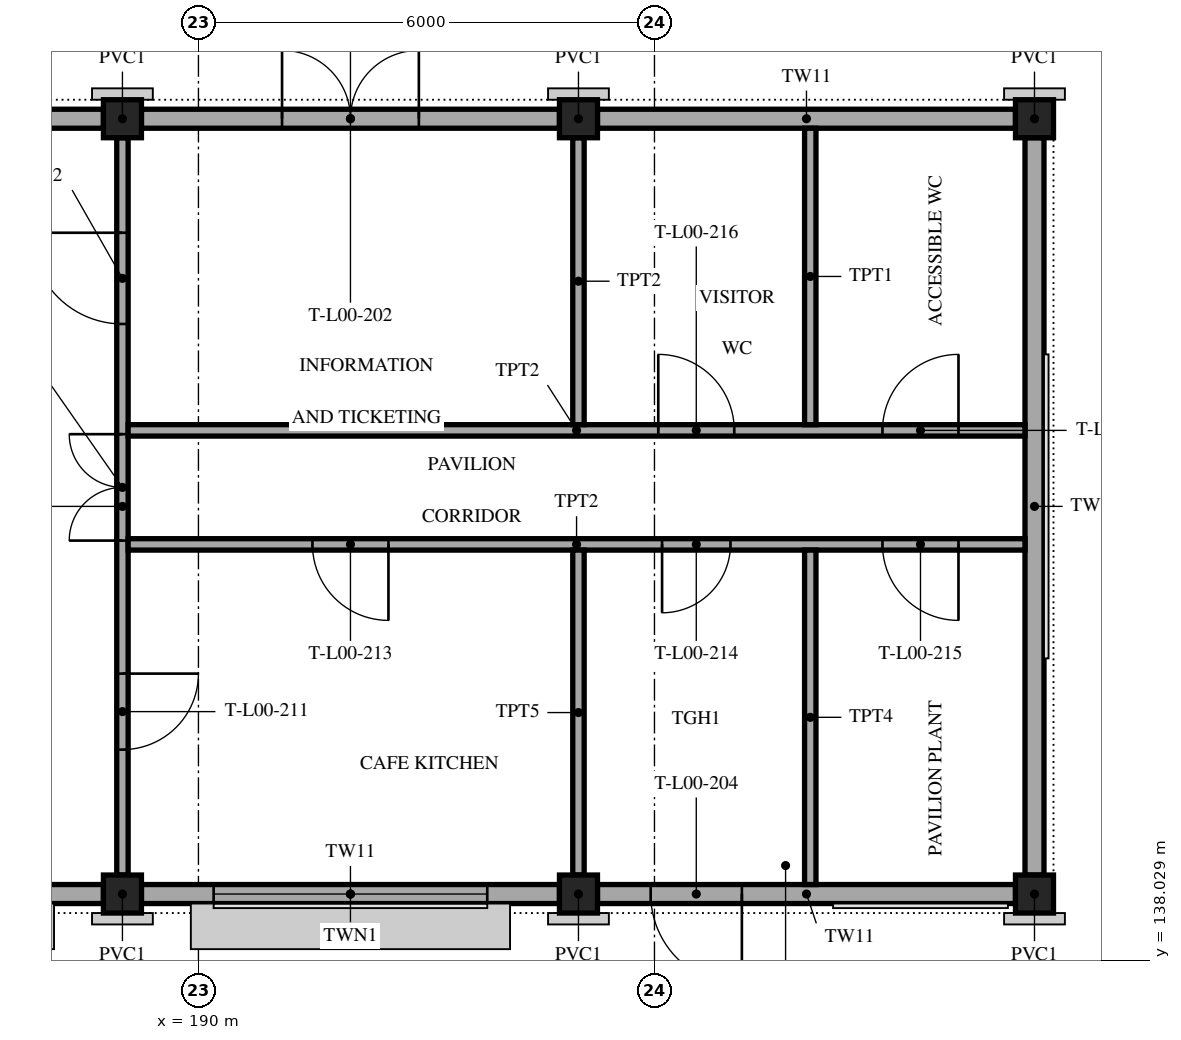
"""IFC4 building model, lengths in metres.
Left out: names, types, materials, properties, quantities, classifications, styles, units other than length and angle.
Written with IfcOpenShell. Run it as: python <this file> out.ifc"""

import sys

from ifc_helpers import new_model, si_unit, direction, frame, frame_2d, origin, origin_2d, place, context, subcontext, project, spatial, polyline, rectangle, outline, extrude, element, fill, save


model = new_model("IFC4")
c1 = context("Model", 3, precision=1e-05, world=origin(), true_north=direction((0.0, 1.0)))
c2 = subcontext(c1, "Body", "Model", "MODEL_VIEW")
j1 = project(units=[si_unit("LENGTHUNIT", "METRE"), si_unit("PLANEANGLEUNIT", "RADIAN")], contexts=[c1])
p1 = place(None, origin())
s1 = spatial("IfcSite", under=j1, at=p1, CompositionType="ELEMENT")
p2 = place(p1, origin())
s2 = spatial("IfcBuilding", under=s1, at=p2, CompositionType="ELEMENT")
p3 = place(p2, origin())
s3 = spatial("IfcBuildingStorey", under=s2, at=p3, CompositionType="ELEMENT", Elevation=0.0)
for number, where, z_axis, x_axis in (
    (1, (189.0, 138.9, 0.0), (0.0, 0.0, 1.0), (1.0, 0.0, 0.0)),
    (2, (189.0, 149.1, 0.0), (0.0, 0.0, 1.0), (1.0, 0.0, 0.0)),
    (3, (195.0, 138.9, 0.0), (0.0, 0.0, 1.0), (1.0, 0.0, 0.0)),
    (4, (195.0, 149.1, 0.0), (0.0, 0.0, 1.0), (1.0, 0.0, 0.0)),
    (5, (201.0, 138.9, 0.0), (0.0, 0.0, 1.0), (1.0, 0.0, 0.0)),
    (6, (201.0, 149.1, 0.0), (0.0, 0.0, 1.0), (1.0, 0.0, 0.0)),
):
    element("IfcColumn", number, at=place(p3, frame(where, z_axis=z_axis, x_axis=x_axis)), inside=s3, PredefinedType="COLUMN", context=c2, shape_type="SweptSolid", body=[
        extrude(rectangle(XDim=0.5, YDim=0.5, at=origin_2d()), origin(), (0.0, 0.0, 1.0), 4.35),
    ])
p4 = place(p3, frame((183.25, 138.9, 0.0), z_axis=(0.0, 0.0, 1.0), x_axis=(1.0, 0.0, 0.0)))
e7 = element("IfcWall", 7, at=p4, inside=s3, PredefinedType="SOLIDWALL", context=c2, shape_type="SweptSolid", body=[
    extrude(rectangle(XDim=5.5, YDim=0.25, at=frame_2d((2.75, 0.0))), origin(), (0.0, 0.0, 1.0), 4.55),
])
p5 = place(p4, frame((0.95, 0.0, 0.9)))
e8 = element("IfcOpeningElement", 8, at=p5, cuts=e7, PredefinedType="OPENING", context=c2, shape_type="SweptSolid", body=[
    extrude(rectangle(XDim=3.6, YDim=2.4, at=frame_2d((1.8, 1.2))), frame((0.0, 0.135, 0.0), z_axis=(0.0, -1.0, 0.0), x_axis=(1.0, 0.0, 0.0)), (0.0, 0.0, 1.0), 0.27),
])
p6 = place(p3, frame((189.25, 138.9, 0.0), z_axis=(0.0, 0.0, 1.0), x_axis=(1.0, 0.0, 0.0)))
e9 = element("IfcWall", 9, at=p6, inside=s3, PredefinedType="SOLIDWALL", context=c2, shape_type="SweptSolid", body=[
    extrude(rectangle(XDim=5.5, YDim=0.25, at=frame_2d((2.75, 0.0))), origin(), (0.0, 0.0, 1.0), 4.55),
])
p7 = place(p6, frame((0.95, 0.0, 0.9)))
e10 = element("IfcOpeningElement", 10, at=p7, cuts=e9, PredefinedType="OPENING", context=c2, shape_type="SweptSolid", body=[
    extrude(rectangle(XDim=3.6, YDim=2.4, at=frame_2d((1.8, 1.2))), frame((0.0, 0.135, 0.0), z_axis=(0.0, -1.0, 0.0), x_axis=(1.0, 0.0, 0.0)), (0.0, 0.0, 1.0), 0.27),
])
p8 = place(p3, frame((195.25, 138.9, 0.0), z_axis=(0.0, 0.0, 1.0), x_axis=(1.0, 0.0, 0.0)))
e11 = element("IfcWall", 11, at=p8, inside=s3, PredefinedType="SOLIDWALL", context=c2, shape_type="SweptSolid", body=[
    extrude(rectangle(XDim=5.5, YDim=0.25, at=frame_2d((2.75, 0.0))), origin(), (0.0, 0.0, 1.0), 4.55),
])
p9 = place(p8, frame((0.7, 0.0, 0.0)))
e12 = element("IfcOpeningElement", 12, at=p9, cuts=e11, PredefinedType="OPENING", context=c2, shape_type="SweptSolid", body=[
    extrude(rectangle(XDim=1.2, YDim=2.1, at=frame_2d((0.6, 1.05))), frame((0.0, 0.135, 0.0), z_axis=(0.0, -1.0, 0.0), x_axis=(1.0, 0.0, 0.0)), (0.0, 0.0, 1.0), 0.27),
])
p10 = place(p3, frame((183.25, 149.1, 0.0), z_axis=(0.0, 0.0, 1.0), x_axis=(1.0, 0.0, 0.0)))
e13 = element("IfcWall", 13, at=p10, inside=s3, PredefinedType="SOLIDWALL", context=c2, shape_type="SweptSolid", body=[
    extrude(rectangle(XDim=5.5, YDim=0.25, at=frame_2d((2.75, 0.0))), origin(), (0.0, 0.0, 1.0), 4.55),
])
p11 = place(p10, frame((0.95, 0.0, 0.9)))
e14 = element("IfcOpeningElement", 14, at=p11, cuts=e13, PredefinedType="OPENING", context=c2, shape_type="SweptSolid", body=[
    extrude(rectangle(XDim=3.6, YDim=2.4, at=frame_2d((1.8, 1.2))), frame((0.0, 0.135, 0.0), z_axis=(0.0, -1.0, 0.0), x_axis=(1.0, 0.0, 0.0)), (0.0, 0.0, 1.0), 0.27),
])
p12 = place(p3, frame((189.25, 149.1, 0.0), z_axis=(0.0, 0.0, 1.0), x_axis=(1.0, 0.0, 0.0)))
e15 = element("IfcWall", 15, at=p12, inside=s3, PredefinedType="SOLIDWALL", context=c2, shape_type="SweptSolid", body=[
    extrude(rectangle(XDim=5.5, YDim=0.25, at=frame_2d((2.75, 0.0))), origin(), (0.0, 0.0, 1.0), 4.55),
])
p13 = place(p12, frame((1.85, 0.0, 0.0)))
e16 = element("IfcOpeningElement", 16, at=p13, cuts=e15, PredefinedType="OPENING", context=c2, shape_type="SweptSolid", body=[
    extrude(rectangle(XDim=1.8, YDim=2.1, at=frame_2d((0.9, 1.05))), frame((0.0, 0.135, 0.0), z_axis=(0.0, -1.0, 0.0), x_axis=(1.0, 0.0, 0.0)), (0.0, 0.0, 1.0), 0.27),
])
p14 = place(p3, frame((195.25, 149.1, 0.0), z_axis=(0.0, 0.0, 1.0), x_axis=(1.0, 0.0, 0.0)))
e17 = element("IfcWall", 17, at=p14, inside=s3, PredefinedType="SOLIDWALL", context=c2, shape_type="SweptSolid", body=[
    extrude(rectangle(XDim=5.5, YDim=0.25, at=frame_2d((2.75, 0.0))), origin(), (0.0, 0.0, 1.0), 4.55),
])
p15 = place(p3, frame((201.0, 139.15, 0.0), z_axis=(0.0, 0.0, 1.0), x_axis=(0.0, 1.0, 0.0)))
e18 = element("IfcWall", 18, at=p15, inside=s3, PredefinedType="SOLIDWALL", context=c2, shape_type="SweptSolid", body=[
    extrude(rectangle(XDim=9.7, YDim=0.25, at=frame_2d((4.85, 0.0))), origin(), (0.0, 0.0, 1.0), 4.35),
])
p16 = place(p3, frame((189.0, 139.15, 0.0), z_axis=(0.0, 0.0, 1.0), x_axis=(0.0, 1.0, 0.0)))
e19 = element("IfcWall", 19, at=p16, inside=s3, PredefinedType="PARTITIONING", context=c2, shape_type="SweptSolid", body=[
    extrude(rectangle(XDim=9.7, YDim=0.15, at=frame_2d((4.85, 0.0))), origin(), (0.0, 0.0, 1.0), 4.35),
])
p17 = place(p16, frame((4.4, 0.0, 0.0)))
e20 = element("IfcOpeningElement", 20, at=p17, cuts=e19, PredefinedType="OPENING", context=c2, shape_type="SweptSolid", body=[
    extrude(rectangle(XDim=1.4, YDim=2.1, at=frame_2d((0.7, 1.05))), frame((0.0, 0.085, 0.0), z_axis=(0.0, -1.0, 0.0), x_axis=(1.0, 0.0, 0.0)), (0.0, 0.0, 1.0), 0.17),
])
p18 = place(p16, frame((1.65, 0.0, 0.0)))
e21 = element("IfcOpeningElement", 21, at=p18, cuts=e19, PredefinedType="OPENING", context=c2, shape_type="SweptSolid", body=[
    extrude(rectangle(XDim=1.0, YDim=2.1, at=frame_2d((0.5, 1.05))), frame((0.0, 0.085, 0.0), z_axis=(0.0, -1.0, 0.0), x_axis=(1.0, 0.0, 0.0)), (0.0, 0.0, 1.0), 0.17),
])
p19 = place(p16, frame((7.25, 0.0, 0.0)))
e22 = element("IfcOpeningElement", 22, at=p19, cuts=e19, PredefinedType="OPENING", context=c2, shape_type="SweptSolid", body=[
    extrude(rectangle(XDim=1.2, YDim=2.1, at=frame_2d((0.6, 1.05))), frame((0.0, 0.085, 0.0), z_axis=(0.0, -1.0, 0.0), x_axis=(1.0, 0.0, 0.0)), (0.0, 0.0, 1.0), 0.17),
])
p20 = place(p3, frame((189.075, 143.5, 0.0), z_axis=(0.0, 0.0, 1.0), x_axis=(1.0, 0.0, 0.0)))
e23 = element("IfcWall", 23, at=p20, inside=s3, PredefinedType="PARTITIONING", context=c2, shape_type="SweptSolid", body=[
    extrude(rectangle(XDim=11.8, YDim=0.15, at=frame_2d((5.9, 0.0))), origin(), (0.0, 0.0, 1.0), 4.55),
])
p21 = place(p20, frame((2.425, 0.0, 0.0)))
e24 = element("IfcOpeningElement", 24, at=p21, cuts=e23, PredefinedType="OPENING", context=c2, shape_type="SweptSolid", body=[
    extrude(rectangle(XDim=1.0, YDim=2.1, at=frame_2d((0.5, 1.05))), frame((0.0, 0.085, 0.0), z_axis=(0.0, -1.0, 0.0), x_axis=(1.0, 0.0, 0.0)), (0.0, 0.0, 1.0), 0.17),
])
p22 = place(p20, frame((7.025, 0.0, 0.0)))
e25 = element("IfcOpeningElement", 25, at=p22, cuts=e23, PredefinedType="OPENING", context=c2, shape_type="SweptSolid", body=[
    extrude(rectangle(XDim=0.9, YDim=2.1, at=frame_2d((0.45, 1.05))), frame((0.0, 0.085, 0.0), z_axis=(0.0, -1.0, 0.0), x_axis=(1.0, 0.0, 0.0)), (0.0, 0.0, 1.0), 0.17),
])
p23 = place(p20, frame((9.925, 0.0, 0.0)))
e26 = element("IfcOpeningElement", 26, at=p23, cuts=e23, PredefinedType="OPENING", context=c2, shape_type="SweptSolid", body=[
    extrude(rectangle(XDim=1.0, YDim=2.1, at=frame_2d((0.5, 1.05))), frame((0.0, 0.085, 0.0), z_axis=(0.0, -1.0, 0.0), x_axis=(1.0, 0.0, 0.0)), (0.0, 0.0, 1.0), 0.17),
])
p24 = place(p3, frame((189.075, 145.0, 0.0), z_axis=(0.0, 0.0, 1.0), x_axis=(1.0, 0.0, 0.0)))
e27 = element("IfcWall", 27, at=p24, inside=s3, PredefinedType="PARTITIONING", context=c2, shape_type="SweptSolid", body=[
    extrude(rectangle(XDim=11.8, YDim=0.15, at=frame_2d((5.9, 0.0))), origin(), (0.0, 0.0, 1.0), 4.55),
])
p25 = place(p24, frame((6.975, 0.0, 0.0)))
e28 = element("IfcOpeningElement", 28, at=p25, cuts=e27, PredefinedType="OPENING", context=c2, shape_type="SweptSolid", body=[
    extrude(rectangle(XDim=1.0, YDim=2.1, at=frame_2d((0.5, 1.05))), frame((0.0, 0.085, 0.0), z_axis=(0.0, -1.0, 0.0), x_axis=(1.0, 0.0, 0.0)), (0.0, 0.0, 1.0), 0.17),
])
p26 = place(p24, frame((9.925, 0.0, 0.0)))
e29 = element("IfcOpeningElement", 29, at=p26, cuts=e27, PredefinedType="OPENING", context=c2, shape_type="SweptSolid", body=[
    extrude(rectangle(XDim=1.0, YDim=2.1, at=frame_2d((0.5, 1.05))), frame((0.0, 0.085, 0.0), z_axis=(0.0, -1.0, 0.0), x_axis=(1.0, 0.0, 0.0)), (0.0, 0.0, 1.0), 0.17),
])
p27 = place(p3, frame((195.0, 139.15, 0.0), z_axis=(0.0, 0.0, 1.0), x_axis=(0.0, 1.0, 0.0)))
e30 = element("IfcWall", 30, at=p27, inside=s3, PredefinedType="PARTITIONING", context=c2, shape_type="SweptSolid", body=[
    extrude(rectangle(XDim=4.275, YDim=0.15, at=frame_2d((2.138, 0.0))), origin(), (0.0, 0.0, 1.0), 4.35),
])
p28 = place(p3, frame((198.05, 139.025, 0.0), z_axis=(0.0, 0.0, 1.0), x_axis=(0.0, 1.0, 0.0)))
e31 = element("IfcWall", 31, at=p28, inside=s3, PredefinedType="PARTITIONING", context=c2, shape_type="SweptSolid", body=[
    extrude(rectangle(XDim=4.4, YDim=0.15, at=frame_2d((2.2, 0.0))), origin(), (0.0, 0.0, 1.0), 4.55),
])
p29 = place(p3, frame((195.0, 145.075, 0.0), z_axis=(0.0, 0.0, 1.0), x_axis=(0.0, 1.0, 0.0)))
e32 = element("IfcWall", 32, at=p29, inside=s3, PredefinedType="PARTITIONING", context=c2, shape_type="SweptSolid", body=[
    extrude(rectangle(XDim=3.775, YDim=0.15, at=frame_2d((1.888, 0.0))), origin(), (0.0, 0.0, 1.0), 4.35),
])
p30 = place(p3, frame((198.05, 145.075, 0.0), z_axis=(0.0, 0.0, 1.0), x_axis=(0.0, 1.0, 0.0)))
e33 = element("IfcWall", 33, at=p30, inside=s3, PredefinedType="PARTITIONING", context=c2, shape_type="SweptSolid", body=[
    extrude(rectangle(XDim=3.9, YDim=0.15, at=frame_2d((1.95, 0.0))), origin(), (0.0, 0.0, 1.0), 4.55),
])
p31 = place(p7, origin())
e34 = element("IfcWindow", 34, at=p31, inside=s3, PartitioningType="TRIPLE_PANEL_VERTICAL", PredefinedType="WINDOW", context=c2, shape_type="SweptSolid", body=[
    extrude(outline(polyline([(0.0, 0.0), (3.6, 0.0), (3.6, 2.4), (0.0, 2.4), (0.0, 0.0)]), holes=[polyline([(0.06, 0.06), (0.96, 0.06), (0.96, 2.34), (0.06, 2.34), (0.06, 0.06)]), polyline([(1.06, 0.06), (2.54, 0.06), (2.54, 2.34), (1.06, 2.34), (1.06, 0.06)]), polyline([(2.64, 0.06), (3.54, 0.06), (3.54, 2.34), (2.64, 2.34), (2.64, 0.06)])]), frame((0.0, 0.03, 0.0), z_axis=(0.0, -1.0, 0.0), x_axis=(1.0, 0.0, 0.0)), (0.0, 0.0, 1.0), 0.06),
    extrude(rectangle(XDim=0.924, YDim=2.304, at=frame_2d((0.51, 1.2))), frame((0.0, 0.01, 0.0), z_axis=(0.0, -1.0, 0.0), x_axis=(1.0, 0.0, 0.0)), (0.0, 0.0, 1.0), 0.02),
    extrude(rectangle(XDim=1.504, YDim=2.304, at=frame_2d((1.8, 1.2))), frame((0.0, 0.01, 0.0), z_axis=(0.0, -1.0, 0.0), x_axis=(1.0, 0.0, 0.0)), (0.0, 0.0, 1.0), 0.02),
    extrude(rectangle(XDim=0.924, YDim=2.304, at=frame_2d((3.09, 1.2))), frame((0.0, 0.01, 0.0), z_axis=(0.0, -1.0, 0.0), x_axis=(1.0, 0.0, 0.0)), (0.0, 0.0, 1.0), 0.02),
])
fill(e10, e34)
p32 = place(p9, frame((1.2, 0.0, 0.0), z_axis=(0.0, 0.0, 1.0), x_axis=(-1.0, 0.0, 0.0)))
e35 = element("IfcDoor", 35, at=p32, inside=s3, OperationType="SINGLE_SWING_LEFT", PredefinedType="DOOR", context=c2, shape_type="SweptSolid", body=[
    extrude(rectangle(XDim=1.2, YDim=2.1, at=frame_2d((0.6, 1.05))), frame((0.0, 0.025, 0.0), z_axis=(0.0, -1.0, 0.0), x_axis=(1.0, 0.0, 0.0)), (0.0, 0.0, 1.0), 0.05),
])
fill(e12, e35)
p33 = place(p13, origin())
e36 = element("IfcDoor", 36, at=p33, inside=s3, OperationType="DOUBLE_DOOR_SINGLE_SWING", PredefinedType="DOOR", context=c2, shape_type="SweptSolid", body=[
    extrude(rectangle(XDim=1.8, YDim=2.1, at=frame_2d((0.9, 1.05))), frame((0.0, 0.025, 0.0), z_axis=(0.0, -1.0, 0.0), x_axis=(1.0, 0.0, 0.0)), (0.0, 0.0, 1.0), 0.05),
])
fill(e16, e36)
p34 = place(p2, frame((0.0, 0.0, 5.0)))
p35 = place(p34, frame((0.0, 0.0, -0.15)))
p36 = place(p35, frame((196.55, 141.2, 0.0)))
p37 = place(p36, frame((0.0, 0.0, 0.1)))
e37 = element("IfcWindow", 37, at=p37, inside=s3, PartitioningType="SINGLE_PANEL", PredefinedType="SKYLIGHT", context=c2, shape_type="SweptSolid", body=[
    extrude(rectangle(XDim=0.9, YDim=0.9, at=origin_2d()), origin(), (0.0, 0.0, 1.0), 0.05),
])
p38 = place(p17, origin())
e38 = element("IfcDoor", 38, at=p38, inside=s3, OperationType="DOUBLE_DOOR_SINGLE_SWING", PredefinedType="DOOR", context=c2, shape_type="SweptSolid", body=[
    extrude(rectangle(XDim=1.4, YDim=2.1, at=frame_2d((0.7, 1.05))), frame((0.0, 0.025, 0.0), z_axis=(0.0, -1.0, 0.0), x_axis=(1.0, 0.0, 0.0)), (0.0, 0.0, 1.0), 0.05),
])
fill(e20, e38)
p39 = place(p18, frame((1.0, 0.0, 0.0), z_axis=(0.0, 0.0, 1.0), x_axis=(-1.0, 0.0, 0.0)))
e39 = element("IfcDoor", 39, at=p39, inside=s3, OperationType="SINGLE_SWING_LEFT", PredefinedType="DOOR", context=c2, shape_type="SweptSolid", body=[
    extrude(rectangle(XDim=1.0, YDim=2.1, at=frame_2d((0.5, 1.05))), frame((0.0, 0.025, 0.0), z_axis=(0.0, -1.0, 0.0), x_axis=(1.0, 0.0, 0.0)), (0.0, 0.0, 1.0), 0.05),
])
fill(e21, e39)
p40 = place(p19, origin())
e40 = element("IfcDoor", 40, at=p40, inside=s3, OperationType="SINGLE_SWING_RIGHT", PredefinedType="DOOR", context=c2, shape_type="SweptSolid", body=[
    extrude(rectangle(XDim=1.2, YDim=2.1, at=frame_2d((0.6, 1.05))), frame((0.0, 0.025, 0.0), z_axis=(0.0, -1.0, 0.0), x_axis=(1.0, 0.0, 0.0)), (0.0, 0.0, 1.0), 0.05),
])
fill(e22, e40)
p41 = place(p21, frame((1.0, 0.0, 0.0), z_axis=(0.0, 0.0, 1.0), x_axis=(-1.0, 0.0, 0.0)))
e41 = element("IfcDoor", 41, at=p41, inside=s3, OperationType="SINGLE_SWING_LEFT", PredefinedType="DOOR", context=c2, shape_type="SweptSolid", body=[
    extrude(rectangle(XDim=1.0, YDim=2.1, at=frame_2d((0.5, 1.05))), frame((0.0, 0.025, 0.0), z_axis=(0.0, -1.0, 0.0), x_axis=(1.0, 0.0, 0.0)), (0.0, 0.0, 1.0), 0.05),
])
fill(e24, e41)
p42 = place(p22, frame((0.9, 0.0, 0.0), z_axis=(0.0, 0.0, 1.0), x_axis=(-1.0, 0.0, 0.0)))
e42 = element("IfcDoor", 42, at=p42, inside=s3, OperationType="SINGLE_SWING_RIGHT", PredefinedType="DOOR", context=c2, shape_type="SweptSolid", body=[
    extrude(rectangle(XDim=0.9, YDim=2.1, at=frame_2d((0.45, 1.05))), frame((0.0, 0.025, 0.0), z_axis=(0.0, -1.0, 0.0), x_axis=(1.0, 0.0, 0.0)), (0.0, 0.0, 1.0), 0.05),
])
fill(e25, e42)
p43 = place(p23, frame((1.0, 0.0, 0.0), z_axis=(0.0, 0.0, 1.0), x_axis=(-1.0, 0.0, 0.0)))
e43 = element("IfcDoor", 43, at=p43, inside=s3, OperationType="SINGLE_SWING_LEFT", PredefinedType="DOOR", context=c2, shape_type="SweptSolid", body=[
    extrude(rectangle(XDim=1.0, YDim=2.1, at=frame_2d((0.5, 1.05))), frame((0.0, 0.025, 0.0), z_axis=(0.0, -1.0, 0.0), x_axis=(1.0, 0.0, 0.0)), (0.0, 0.0, 1.0), 0.05),
])
fill(e26, e43)
p44 = place(p25, origin())
e44 = element("IfcDoor", 44, at=p44, inside=s3, OperationType="SINGLE_SWING_LEFT", PredefinedType="DOOR", context=c2, shape_type="SweptSolid", body=[
    extrude(rectangle(XDim=1.0, YDim=2.1, at=frame_2d((0.5, 1.05))), frame((0.0, 0.025, 0.0), z_axis=(0.0, -1.0, 0.0), x_axis=(1.0, 0.0, 0.0)), (0.0, 0.0, 1.0), 0.05),
])
fill(e28, e44)
p45 = place(p26, origin())
e45 = element("IfcDoor", 45, at=p45, inside=s3, OperationType="SINGLE_SWING_RIGHT", PredefinedType="DOOR", context=c2, shape_type="SweptSolid", body=[
    extrude(rectangle(XDim=1.0, YDim=2.1, at=frame_2d((0.5, 1.05))), frame((0.0, 0.025, 0.0), z_axis=(0.0, -1.0, 0.0), x_axis=(1.0, 0.0, 0.0)), (0.0, 0.0, 1.0), 0.05),
])
fill(e29, e45)
save(model, sys.argv[1])
